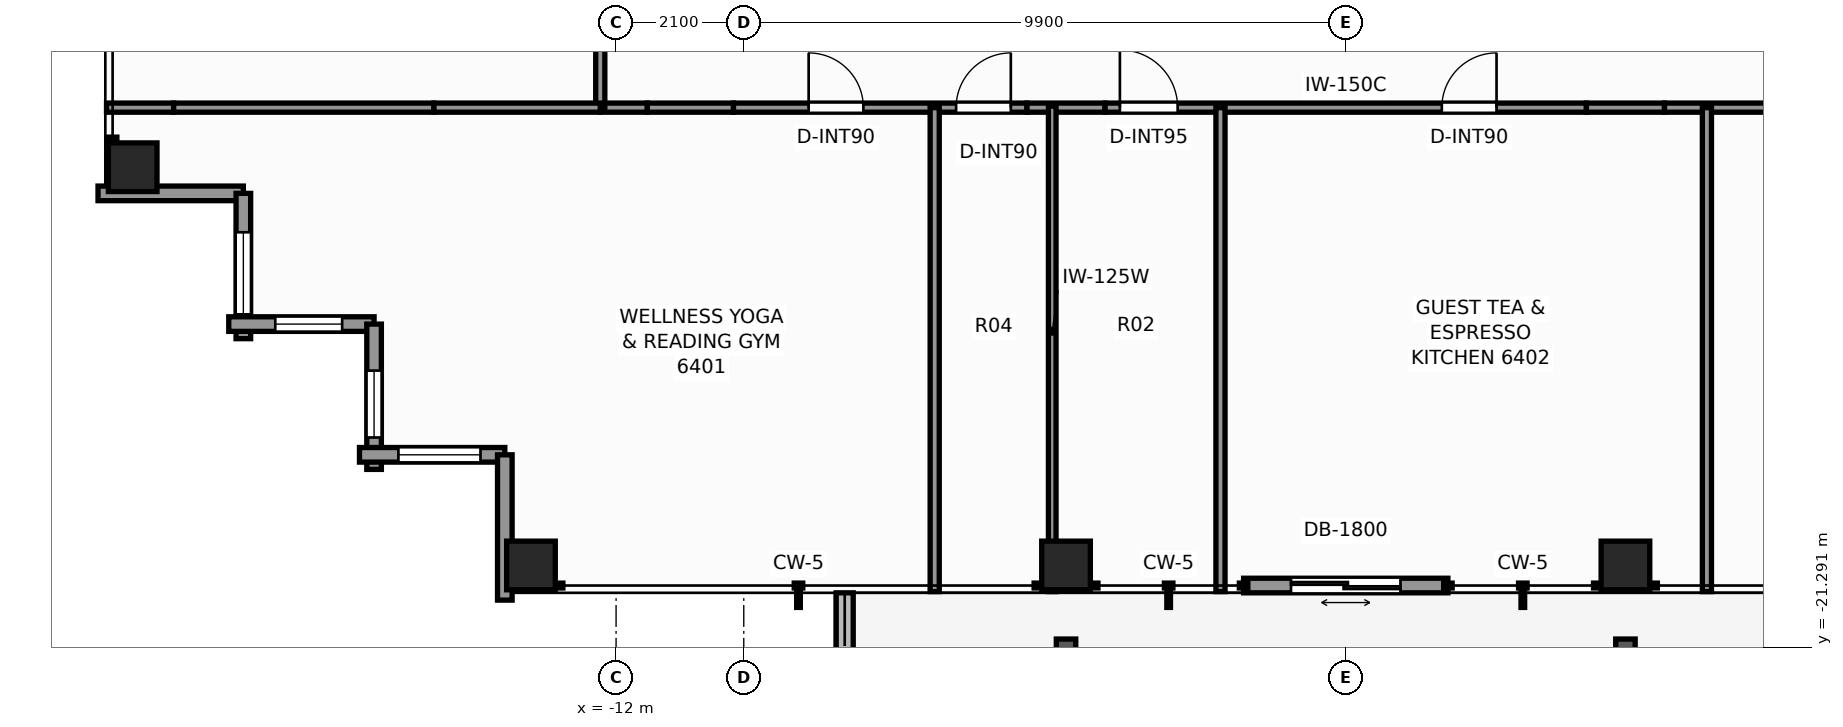
"""IFC4 building model, lengths in metres.
Left out: names, types, materials, properties, quantities, classifications, styles, units other than length and angle.
Written with IfcOpenShell. Run it as: python <this file> out.ifc"""

import sys

from ifc_helpers import new_model, si_unit, direction, frame, frame_2d, origin, origin_2d, place, context, subcontext, project, spatial, rectangle, extrude, element, fill, save


model = new_model("IFC4")
c1 = context("Model", 3, precision=1e-05, world=origin(), true_north=direction((0.0, 1.0)))
c2 = subcontext(c1, "Body", "Model", "MODEL_VIEW")
j1 = project(units=[si_unit("LENGTHUNIT", "METRE"), si_unit("PLANEANGLEUNIT", "RADIAN")], contexts=[c1])
p1 = place(None, origin())
s1 = spatial("IfcSite", under=j1, at=p1, CompositionType="ELEMENT")
p2 = place(p1, origin())
s2 = spatial("IfcBuilding", under=s1, at=p2, CompositionType="ELEMENT")
p3 = place(p2, frame((0.0, 0.0, 219.6)))
s3 = spatial("IfcBuildingStorey", under=s2, at=p3, CompositionType="ELEMENT", Elevation=219.6)
for number, where, z_axis, x_axis in (
    (1, (-13.4, -19.95, 0.0), (0.0, 0.0, 1.0), (1.0, 0.0, 0.0)),
    (2, (-4.6, -19.95, 0.0), (0.0, 0.0, 1.0), (1.0, 0.0, 0.0)),
    (3, (4.6, -19.95, 0.0), (0.0, 0.0, 1.0), (1.0, 0.0, 0.0)),
    (4, (-19.95, -13.4, 0.0), (0.0, 0.0, 1.0), (1.0, 0.0, 0.0)),
):
    element("IfcColumn", number, at=place(p3, frame(where, z_axis=z_axis, x_axis=x_axis)), inside=s3, PredefinedType="COLUMN", context=c2, shape_type="SweptSolid", body=[
        extrude(rectangle(XDim=0.8, YDim=0.8, at=origin_2d()), origin(), (0.0, 0.0, 1.0), 3.3),
    ])
p4 = place(p3, frame((-8.24, -20.4, -0.04), z_axis=(0.0, 0.0, 1.0), x_axis=(0.0, -1.0, 0.0)))
e5 = element("IfcWall", 5, at=p4, inside=s3, PredefinedType="PARAPET", context=c2, shape_type="SweptSolid", body=[
    extrude(rectangle(XDim=2.674, YDim=0.28, at=frame_2d((1.337, 0.0))), origin(), (0.0, 0.0, 1.0), 0.42),
])
p5 = place(p3, frame((1.68, -20.28, 0.0), z_axis=(0.0, 0.0, 1.0), x_axis=(-1.0, 0.0, 0.0)))
e6 = element("IfcWall", 6, at=p5, inside=s3, PredefinedType="STANDARD", context=c2, shape_type="SweptSolid", body=[
    extrude(rectangle(XDim=3.36, YDim=0.24, at=frame_2d((1.68, 0.0))), origin(), (0.0, 0.0, 1.0), 3.08),
])
p6 = place(p5, frame((0.78, 0.0, 0.0)))
e7 = element("IfcOpeningElement", 7, at=p6, cuts=e6, PredefinedType="OPENING", context=c2, shape_type="SweptSolid", body=[
    extrude(rectangle(XDim=1.8, YDim=2.2, at=frame_2d((0.9, 1.1))), frame((0.0, 0.13, 0.0), z_axis=(0.0, -1.0, 0.0), x_axis=(1.0, 0.0, 0.0)), (0.0, 0.0, 1.0), 0.26),
])
p7 = place(p3, frame((-18.13, -13.83, 0.0), z_axis=(0.0, 0.0, 1.0), x_axis=(-1.0, 0.0, 0.0)))
e8 = element("IfcWall", 8, at=p7, inside=s3, PredefinedType="STANDARD", context=c2, shape_type="SweptSolid", body=[
    extrude(rectangle(XDim=2.39, YDim=0.24, at=frame_2d((1.195, 0.0))), origin(), (0.0, 0.0, 1.0), 1.275),
])
p8 = place(p3, frame((-18.13, -16.22, 0.0), z_axis=(0.0, 0.0, 1.0), x_axis=(0.0, 1.0, 0.0)))
e9 = element("IfcWall", 9, at=p8, inside=s3, PredefinedType="STANDARD", context=c2, shape_type="SweptSolid", body=[
    extrude(rectangle(XDim=2.39, YDim=0.24, at=frame_2d((1.195, 0.0))), origin(), (0.0, 0.0, 1.0), 2.463),
])
p9 = place(p8, frame((0.4, 0.0, 0.65)))
e10 = element("IfcOpeningElement", 10, at=p9, cuts=e9, PredefinedType="OPENING", context=c2, shape_type="SweptSolid", body=[
    extrude(rectangle(XDim=1.35, YDim=1.55, at=frame_2d((0.675, 0.775))), frame((0.0, 0.13, 0.0), z_axis=(0.0, -1.0, 0.0), x_axis=(1.0, 0.0, 0.0)), (0.0, 0.0, 1.0), 0.26),
])
p10 = place(p3, frame((-15.98, -15.98, 0.0), z_axis=(0.0, 0.0, 1.0), x_axis=(-1.0, 0.0, 0.0)))
e11 = element("IfcWall", 11, at=p10, inside=s3, PredefinedType="STANDARD", context=c2, shape_type="SweptSolid", body=[
    extrude(rectangle(XDim=2.39, YDim=0.24, at=frame_2d((1.195, 0.0))), origin(), (0.0, 0.0, 1.0), 2.463),
])
p11 = place(p10, frame((0.525, 0.0, 0.65)))
e12 = element("IfcOpeningElement", 12, at=p11, cuts=e11, PredefinedType="OPENING", context=c2, shape_type="SweptSolid", body=[
    extrude(rectangle(XDim=1.1, YDim=1.45, at=frame_2d((0.55, 0.725))), frame((0.0, 0.13, 0.0), z_axis=(0.0, -1.0, 0.0), x_axis=(1.0, 0.0, 0.0)), (0.0, 0.0, 1.0), 0.26),
])
p12 = place(p3, frame((-15.98, -18.37, 0.0), z_axis=(0.0, 0.0, 1.0), x_axis=(0.0, 1.0, 0.0)))
e13 = element("IfcWall", 13, at=p12, inside=s3, PredefinedType="STANDARD", context=c2, shape_type="SweptSolid", body=[
    extrude(rectangle(XDim=2.39, YDim=0.24, at=frame_2d((1.195, 0.0))), origin(), (0.0, 0.0, 1.0), 2.463),
])
p13 = place(p12, frame((0.525, 0.0, 0.65)))
e14 = element("IfcOpeningElement", 14, at=p13, cuts=e13, PredefinedType="OPENING", context=c2, shape_type="SweptSolid", body=[
    extrude(rectangle(XDim=1.1, YDim=1.45, at=frame_2d((0.55, 0.725))), frame((0.0, 0.13, 0.0), z_axis=(0.0, -1.0, 0.0), x_axis=(1.0, 0.0, 0.0)), (0.0, 0.0, 1.0), 0.26),
])
p14 = place(p3, frame((-13.83, -18.13, 0.0), z_axis=(0.0, 0.0, 1.0), x_axis=(-1.0, 0.0, 0.0)))
e15 = element("IfcWall", 15, at=p14, inside=s3, PredefinedType="STANDARD", context=c2, shape_type="SweptSolid", body=[
    extrude(rectangle(XDim=2.39, YDim=0.24, at=frame_2d((1.195, 0.0))), origin(), (0.0, 0.0, 1.0), 2.463),
])
p15 = place(p14, frame((0.4, 0.0, 0.65)))
e16 = element("IfcOpeningElement", 16, at=p15, cuts=e15, PredefinedType="OPENING", context=c2, shape_type="SweptSolid", body=[
    extrude(rectangle(XDim=1.35, YDim=1.55, at=frame_2d((0.675, 0.775))), frame((0.0, 0.13, 0.0), z_axis=(0.0, -1.0, 0.0), x_axis=(1.0, 0.0, 0.0)), (0.0, 0.0, 1.0), 0.26),
])
p16 = place(p3, frame((-13.83, -20.52, 0.0), z_axis=(0.0, 0.0, 1.0), x_axis=(0.0, 1.0, 0.0)))
e17 = element("IfcWall", 17, at=p16, inside=s3, PredefinedType="STANDARD", context=c2, shape_type="SweptSolid", body=[
    extrude(rectangle(XDim=2.39, YDim=0.24, at=frame_2d((1.195, 0.0))), origin(), (0.0, 0.0, 1.0), 1.275),
])
p17 = place(p3, frame((-12.26, -12.42, 0.0), z_axis=(0.0, 0.0, 1.0), x_axis=(1.0, 0.0, 0.0)))
e18 = element("IfcWall", 18, at=p17, inside=s3, PredefinedType="PARTITIONING", context=c2, shape_type="SweptSolid", body=[
    extrude(rectangle(XDim=0.774, YDim=0.15, at=frame_2d((0.387, 0.0))), origin(), (0.0, 0.0, 1.0), 3.08),
])
p18 = place(p3, frame((-11.486, -12.42, 0.0), z_axis=(0.0, 0.0, 1.0), x_axis=(1.0, 0.0, 0.0)))
e19 = element("IfcWall", 19, at=p18, inside=s3, PredefinedType="PARTITIONING", context=c2, shape_type="SweptSolid", body=[
    extrude(rectangle(XDim=1.417, YDim=0.15, at=frame_2d((0.708, 0.0))), origin(), (0.0, 0.0, 1.0), 1.265),
])
p19 = place(p3, frame((-10.069, -12.42, 0.0), z_axis=(0.0, 0.0, 1.0), x_axis=(1.0, 0.0, 0.0)))
e20 = element("IfcWall", 20, at=p19, inside=s3, PredefinedType="PARTITIONING", context=c2, shape_type="SweptSolid", body=[
    extrude(rectangle(XDim=4.827, YDim=0.15, at=frame_2d((2.414, 0.0))), origin(), (0.0, 0.0, 1.0), 3.08),
])
p20 = place(p19, frame((1.236, 0.0, 0.0)))
e21 = element("IfcOpeningElement", 21, at=p20, cuts=e20, PredefinedType="OPENING", context=c2, shape_type="SweptSolid", body=[
    extrude(rectangle(XDim=0.9, YDim=2.06, at=frame_2d((0.45, 1.03))), frame((0.0, 0.085, 0.0), z_axis=(0.0, -1.0, 0.0), x_axis=(1.0, 0.0, 0.0)), (0.0, 0.0, 1.0), 0.17),
])
p21 = place(p19, frame((3.661, 0.0, 0.0)))
e22 = element("IfcOpeningElement", 22, at=p21, cuts=e20, PredefinedType="OPENING", context=c2, shape_type="SweptSolid", body=[
    extrude(rectangle(XDim=0.9, YDim=2.06, at=frame_2d((0.45, 1.03))), frame((0.0, 0.085, 0.0), z_axis=(0.0, -1.0, 0.0), x_axis=(1.0, 0.0, 0.0)), (0.0, 0.0, 1.0), 0.17),
])
p22 = place(p3, frame((-5.242, -12.42, 0.0), z_axis=(0.0, 0.0, 1.0), x_axis=(1.0, 0.0, 0.0)))
e23 = element("IfcWall", 23, at=p22, inside=s3, PredefinedType="PARTITIONING", context=c2, shape_type="SweptSolid", body=[
    extrude(rectangle(XDim=1.284, YDim=0.15, at=frame_2d((0.642, 0.0))), origin(), (0.0, 0.0, 1.0), 1.265),
])
p23 = place(p3, frame((-3.958, -12.42, 0.0), z_axis=(0.0, 0.0, 1.0), x_axis=(1.0, 0.0, 0.0)))
e24 = element("IfcWall", 24, at=p23, inside=s3, PredefinedType="PARTITIONING", context=c2, shape_type="SweptSolid", body=[
    extrude(rectangle(XDim=7.916, YDim=0.15, at=frame_2d((3.958, 0.0))), origin(), (0.0, 0.0, 1.0), 2.605),
])
p24 = place(p23, frame((0.244, 0.0, 0.0)))
e25 = element("IfcOpeningElement", 25, at=p24, cuts=e24, PredefinedType="OPENING", context=c2, shape_type="SweptSolid", body=[
    extrude(rectangle(XDim=0.95, YDim=2.06, at=frame_2d((0.475, 1.03))), frame((0.0, 0.085, 0.0), z_axis=(0.0, -1.0, 0.0), x_axis=(1.0, 0.0, 0.0)), (0.0, 0.0, 1.0), 0.17),
])
p25 = place(p23, frame((5.538, 0.0, 0.0)))
e26 = element("IfcOpeningElement", 26, at=p25, cuts=e24, PredefinedType="OPENING", context=c2, shape_type="SweptSolid", body=[
    extrude(rectangle(XDim=0.9, YDim=2.06, at=frame_2d((0.45, 1.03))), frame((0.0, 0.085, 0.0), z_axis=(0.0, -1.0, 0.0), x_axis=(1.0, 0.0, 0.0)), (0.0, 0.0, 1.0), 0.17),
])
p26 = place(p3, frame((3.958, -12.42, 0.0), z_axis=(0.0, 0.0, 1.0), x_axis=(1.0, 0.0, 0.0)))
e27 = element("IfcWall", 27, at=p26, inside=s3, PredefinedType="PARTITIONING", context=c2, shape_type="SweptSolid", body=[
    extrude(rectangle(XDim=1.284, YDim=0.15, at=frame_2d((0.642, 0.0))), origin(), (0.0, 0.0, 1.0), 1.265),
])
p27 = place(p3, frame((5.242, -12.42, 0.0), z_axis=(0.0, 0.0, 1.0), x_axis=(1.0, 0.0, 0.0)))
e28 = element("IfcWall", 28, at=p27, inside=s3, PredefinedType="PARTITIONING", context=c2, shape_type="SweptSolid", body=[
    extrude(rectangle(XDim=4.827, YDim=0.15, at=frame_2d((2.414, 0.0))), origin(), (0.0, 0.0, 1.0), 3.08),
])
p28 = place(p27, frame((2.18, 0.0, 0.0)))
e29 = element("IfcOpeningElement", 29, at=p28, cuts=e28, PredefinedType="OPENING", context=c2, shape_type="SweptSolid", body=[
    extrude(rectangle(XDim=0.9, YDim=2.06, at=frame_2d((0.45, 1.03))), frame((0.0, 0.085, 0.0), z_axis=(0.0, -1.0, 0.0), x_axis=(1.0, 0.0, 0.0)), (0.0, 0.0, 1.0), 0.17),
])
p29 = place(p3, frame((-12.26, -12.42, 0.0), z_axis=(0.0, 0.0, 1.0), x_axis=(0.0, 1.0, 0.0)))
e30 = element("IfcWall", 30, at=p29, inside=s3, PredefinedType="PARTITIONING", context=c2, shape_type="SweptSolid", body=[
    extrude(rectangle(XDim=0.99, YDim=0.15, at=frame_2d((0.495, 0.0))), origin(), (0.0, 0.0, 1.0), 3.08),
])
p30 = place(p3, frame((-20.38, -12.42, 0.0), z_axis=(0.0, 0.0, 1.0), x_axis=(1.0, 0.0, 0.0)))
e31 = element("IfcWall", 31, at=p30, inside=s3, PredefinedType="PARTITIONING", context=c2, shape_type="SweptSolid", body=[
    extrude(rectangle(XDim=1.103, YDim=0.15, at=frame_2d((0.552, 0.0))), origin(), (0.0, 0.0, 1.0), 2.453),
])
p31 = place(p3, frame((-19.277, -12.42, 0.0), z_axis=(0.0, 0.0, 1.0), x_axis=(1.0, 0.0, 0.0)))
e32 = element("IfcWall", 32, at=p31, inside=s3, PredefinedType="PARTITIONING", context=c2, shape_type="SweptSolid", body=[
    extrude(rectangle(XDim=4.281, YDim=0.15, at=frame_2d((2.141, 0.0))), origin(), (0.0, 0.0, 1.0), 1.265),
])
p32 = place(p3, frame((-14.995, -12.42, 0.0), z_axis=(0.0, 0.0, 1.0), x_axis=(1.0, 0.0, 0.0)))
e33 = element("IfcWall", 33, at=p32, inside=s3, PredefinedType="PARTITIONING", context=c2, shape_type="SweptSolid", body=[
    extrude(rectangle(XDim=2.735, YDim=0.15, at=frame_2d((1.368, 0.0))), origin(), (0.0, 0.0, 1.0), 3.08),
])
for number, where, z_axis, x_axis in (
    (34, (-6.76, -20.38, 0.0), (0.0, 0.0, 1.0), (0.0, 1.0, 0.0)),
    (35, (-2.06, -20.38, 0.0), (0.0, 0.0, 1.0), (0.0, 1.0, 0.0)),
):
    element("IfcWall", number, at=place(p3, frame(where, z_axis=z_axis, x_axis=x_axis)), inside=s3, PredefinedType="PARTITIONING", context=c2, shape_type="SweptSolid", body=[
        extrude(rectangle(XDim=7.96, YDim=0.15, at=frame_2d((3.98, 0.0))), origin(), (0.0, 0.0, 1.0), 2.453),
    ])
p33 = place(p3, frame((-4.827, -20.38, 0.0), z_axis=(0.0, 0.0, 1.0), x_axis=(0.0, 1.0, 0.0)))
e36 = element("IfcWall", 36, at=p33, inside=s3, PredefinedType="PARTITIONING", context=c2, shape_type="SweptSolid", body=[
    extrude(rectangle(XDim=0.58, YDim=0.125, at=frame_2d((0.29, 0.0))), origin(), (0.0, 0.0, 1.0), 2.453),
])
p34 = place(p3, frame((-4.827, -19.8, 0.0), z_axis=(0.0, 0.0, 1.0), x_axis=(0.0, 1.0, 0.0)))
e37 = element("IfcWall", 37, at=p34, inside=s3, PredefinedType="PARTITIONING", context=c2, shape_type="SweptSolid", body=[
    extrude(rectangle(XDim=7.405, YDim=0.125, at=frame_2d((3.703, 0.0))), origin(), (0.0, 0.0, 1.0), 1.265),
])
p35 = place(p3, frame((5.94, -20.38, 0.0), z_axis=(0.0, 0.0, 1.0), x_axis=(0.0, 1.0, 0.0)))
e38 = element("IfcWall", 38, at=p35, inside=s3, PredefinedType="PARTITIONING", context=c2, shape_type="SweptSolid", body=[
    extrude(rectangle(XDim=7.96, YDim=0.15, at=frame_2d((3.98, 0.0))), origin(), (0.0, 0.0, 1.0), 2.453),
])
p36 = place(p6, origin())
e39 = element("IfcDoor", 39, at=p36, inside=s3, OperationType="DOUBLE_DOOR_SLIDING", PredefinedType="DOOR", context=c2, shape_type="SweptSolid", body=[
    extrude(rectangle(XDim=1.8, YDim=2.2, at=frame_2d((0.9, 1.1))), frame((0.0, 0.025, 0.0), z_axis=(0.0, -1.0, 0.0), x_axis=(1.0, 0.0, 0.0)), (0.0, 0.0, 1.0), 0.05),
])
fill(e7, e39)
p37 = place(p9, origin())
e40 = element("IfcWindow", 40, at=p37, inside=s3, PartitioningType="SINGLE_PANEL", PredefinedType="WINDOW", context=c2, shape_type="SweptSolid", body=[
    extrude(rectangle(XDim=1.35, YDim=1.55, at=frame_2d((0.675, 0.775))), frame((0.0, 0.03, 0.0), z_axis=(0.0, -1.0, 0.0), x_axis=(1.0, 0.0, 0.0)), (0.0, 0.0, 1.0), 0.06),
])
fill(e10, e40)
p38 = place(p11, origin())
e41 = element("IfcWindow", 41, at=p38, inside=s3, PartitioningType="SINGLE_PANEL", PredefinedType="WINDOW", context=c2, shape_type="SweptSolid", body=[
    extrude(rectangle(XDim=1.1, YDim=1.45, at=frame_2d((0.55, 0.725))), frame((0.0, 0.03, 0.0), z_axis=(0.0, -1.0, 0.0), x_axis=(1.0, 0.0, 0.0)), (0.0, 0.0, 1.0), 0.06),
])
fill(e12, e41)
p39 = place(p13, origin())
e42 = element("IfcWindow", 42, at=p39, inside=s3, PartitioningType="SINGLE_PANEL", PredefinedType="WINDOW", context=c2, shape_type="SweptSolid", body=[
    extrude(rectangle(XDim=1.1, YDim=1.45, at=frame_2d((0.55, 0.725))), frame((0.0, 0.03, 0.0), z_axis=(0.0, -1.0, 0.0), x_axis=(1.0, 0.0, 0.0)), (0.0, 0.0, 1.0), 0.06),
])
fill(e14, e42)
p40 = place(p15, origin())
e43 = element("IfcWindow", 43, at=p40, inside=s3, PartitioningType="SINGLE_PANEL", PredefinedType="WINDOW", context=c2, shape_type="SweptSolid", body=[
    extrude(rectangle(XDim=1.35, YDim=1.55, at=frame_2d((0.675, 0.775))), frame((0.0, 0.03, 0.0), z_axis=(0.0, -1.0, 0.0), x_axis=(1.0, 0.0, 0.0)), (0.0, 0.0, 1.0), 0.06),
])
fill(e16, e43)
p41 = place(p20, origin())
e44 = element("IfcDoor", 44, at=p41, inside=s3, OperationType="SINGLE_SWING_LEFT", PredefinedType="DOOR", context=c2, shape_type="SweptSolid", body=[
    extrude(rectangle(XDim=0.9, YDim=2.06, at=frame_2d((0.45, 1.03))), frame((0.0, 0.025, 0.0), z_axis=(0.0, -1.0, 0.0), x_axis=(1.0, 0.0, 0.0)), (0.0, 0.0, 1.0), 0.05),
])
fill(e21, e44)
p42 = place(p21, origin())
e45 = element("IfcDoor", 45, at=p42, inside=s3, OperationType="SINGLE_SWING_RIGHT", PredefinedType="DOOR", context=c2, shape_type="SweptSolid", body=[
    extrude(rectangle(XDim=0.9, YDim=2.06, at=frame_2d((0.45, 1.03))), frame((0.0, 0.025, 0.0), z_axis=(0.0, -1.0, 0.0), x_axis=(1.0, 0.0, 0.0)), (0.0, 0.0, 1.0), 0.05),
])
fill(e22, e45)
p43 = place(p24, origin())
e46 = element("IfcDoor", 46, at=p43, inside=s3, OperationType="SINGLE_SWING_LEFT", PredefinedType="DOOR", context=c2, shape_type="SweptSolid", body=[
    extrude(rectangle(XDim=0.95, YDim=2.06, at=frame_2d((0.475, 1.03))), frame((0.0, 0.025, 0.0), z_axis=(0.0, -1.0, 0.0), x_axis=(1.0, 0.0, 0.0)), (0.0, 0.0, 1.0), 0.05),
])
fill(e25, e46)
p44 = place(p25, origin())
e47 = element("IfcDoor", 47, at=p44, inside=s3, OperationType="SINGLE_SWING_RIGHT", PredefinedType="DOOR", context=c2, shape_type="SweptSolid", body=[
    extrude(rectangle(XDim=0.9, YDim=2.06, at=frame_2d((0.45, 1.03))), frame((0.0, 0.025, 0.0), z_axis=(0.0, -1.0, 0.0), x_axis=(1.0, 0.0, 0.0)), (0.0, 0.0, 1.0), 0.05),
])
fill(e26, e47)
save(model, sys.argv[1])
